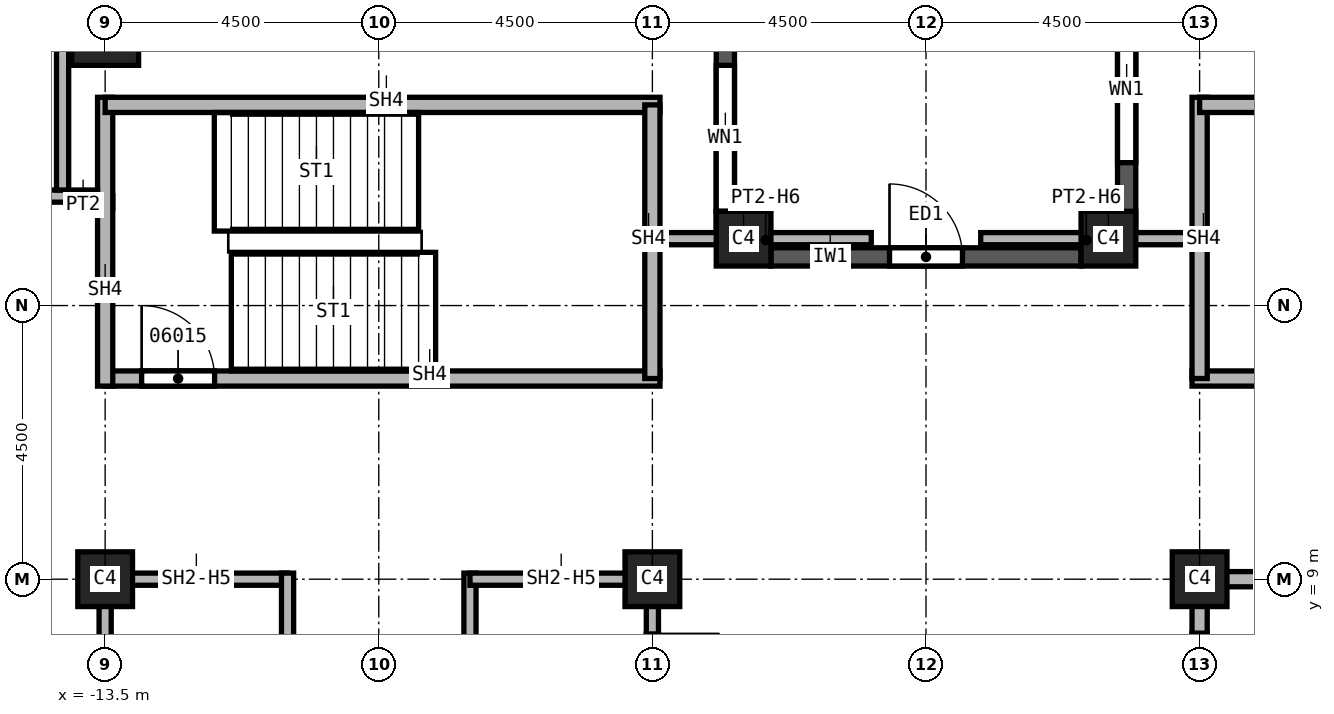
"""IFC4 building model, lengths in metres.
Left out: names, types, materials, properties, quantities, classifications, styles, units other than length and angle.
Written with IfcOpenShell. Run it as: python <this file> out.ifc"""

import sys

from ifc_helpers import new_model, si_unit, direction, frame, frame_2d, origin, origin_2d, place, context, subcontext, project, spatial, rectangle, extrude, element, fill, save


model = new_model("IFC4")
c1 = context("Model", 3, precision=1e-05, world=origin(), true_north=direction((0.0, 1.0)))
c2 = subcontext(c1, "Body", "Model", "MODEL_VIEW")
j1 = project(units=[si_unit("LENGTHUNIT", "METRE"), si_unit("PLANEANGLEUNIT", "RADIAN")], contexts=[c1])
p1 = place(None, origin())
s1 = spatial("IfcSite", under=j1, at=p1, CompositionType="ELEMENT")
p2 = place(p1, origin())
s2 = spatial("IfcBuilding", under=s1, at=p2, CompositionType="ELEMENT")
p3 = place(p2, frame((0.0, 0.0, 126.0)))
s3 = spatial("IfcBuildingStorey", under=s2, at=p3, CompositionType="ELEMENT", Elevation=126.0)
p4 = place(p3, frame((-13.5, 18.0, 0.0), z_axis=(0.0, 0.0, 1.0), x_axis=(1.0, 0.0, 0.0)))
e1 = element("IfcColumn", 1, at=p4, inside=s3, PredefinedType="COLUMN", context=c2, shape_type="SweptSolid", body=[
    extrude(rectangle(XDim=1.1, YDim=1.1, at=origin_2d()), origin(), (0.0, 0.0, 1.0), 3.7),
])
for number, where, z_axis, x_axis in (
    (2, (4.5, 9.0, 0.0), (0.0, 0.0, 1.0), (1.0, 0.0, 0.0)),
    (3, (-4.5, 9.0, 0.0), (0.0, 0.0, 1.0), (1.0, 0.0, 0.0)),
    (4, (-13.5, 9.0, 0.0), (0.0, 0.0, 1.0), (1.0, 0.0, 0.0)),
    (5, (3.0, 14.6, 0.0), (0.0, 0.0, 1.0), (1.0, 0.0, 0.0)),
    (6, (-3.0, 14.6, 0.0), (0.0, 0.0, 1.0), (1.0, 0.0, 0.0)),
):
    element("IfcColumn", number, at=place(p3, frame(where, z_axis=z_axis, x_axis=x_axis)), inside=s3, PredefinedType="COLUMN", context=c2, shape_type="SweptSolid", body=[
        extrude(rectangle(XDim=0.9, YDim=0.9, at=origin_2d()), origin(), (0.0, 0.0, 1.0), 3.7),
    ])
p5 = place(p3, frame((3.3, 23.05, 0.0), z_axis=(0.0, 0.0, 1.0), x_axis=(0.0, -1.0, 0.0)))
e7 = element("IfcWall", 7, at=p5, inside=s3, PredefinedType="SOLIDWALL", context=c2, shape_type="SweptSolid", body=[
    extrude(rectangle(XDim=8.4, YDim=0.3, at=frame_2d((4.2, 0.0))), origin(), (0.0, 0.0, 1.0), 3.1),
])
p6 = place(p5, frame((0.8, 0.0, 0.8)))
e8 = element("IfcOpeningElement", 8, at=p6, cuts=e7, PredefinedType="OPENING", context=c2, shape_type="SweptSolid", body=[
    extrude(rectangle(XDim=2.4, YDim=1.95, at=frame_2d((1.2, 0.975))), frame((0.0, 0.15, 0.0), z_axis=(0.0, -1.0, 0.0), x_axis=(1.0, 0.0, 0.0)), (0.0, 0.0, 1.0), 0.3),
])
p7 = place(p5, frame((4.8, 0.0, 0.8)))
e9 = element("IfcOpeningElement", 9, at=p7, cuts=e7, PredefinedType="OPENING", context=c2, shape_type="SweptSolid", body=[
    extrude(rectangle(XDim=2.4, YDim=1.95, at=frame_2d((1.2, 0.975))), frame((0.0, 0.15, 0.0), z_axis=(0.0, -1.0, 0.0), x_axis=(1.0, 0.0, 0.0)), (0.0, 0.0, 1.0), 0.3),
])
p8 = place(p3, frame((-2.55, 14.3, 0.0), z_axis=(0.0, 0.0, 1.0), x_axis=(1.0, 0.0, 0.0)))
e10 = element("IfcWall", 10, at=p8, inside=s3, PredefinedType="SOLIDWALL", context=c2, shape_type="SweptSolid", body=[
    extrude(rectangle(XDim=5.1, YDim=0.3, at=frame_2d((2.55, 0.0))), origin(), (0.0, 0.0, 1.0), 3.1),
])
p9 = place(p8, frame((1.95, 0.0, 0.0)))
e11 = element("IfcOpeningElement", 11, at=p9, cuts=e10, PredefinedType="OPENING", context=c2, shape_type="SweptSolid", body=[
    extrude(rectangle(XDim=1.2, YDim=2.4, at=frame_2d((0.6, 1.2))), frame((0.0, 0.15, 0.0), z_axis=(0.0, -1.0, 0.0), x_axis=(1.0, 0.0, 0.0)), (0.0, 0.0, 1.0), 0.3),
])
p10 = place(p3, frame((-3.3, 14.65, 0.0), z_axis=(0.0, 0.0, 1.0), x_axis=(0.0, 1.0, 0.0)))
e12 = element("IfcWall", 12, at=p10, inside=s3, PredefinedType="SOLIDWALL", context=c2, shape_type="SweptSolid", body=[
    extrude(rectangle(XDim=8.4, YDim=0.3, at=frame_2d((4.2, 0.0))), origin(), (0.0, 0.0, 1.0), 3.1),
])
p11 = place(p10, frame((0.4, 0.0, 0.8)))
e13 = element("IfcOpeningElement", 13, at=p11, cuts=e12, PredefinedType="OPENING", context=c2, shape_type="SweptSolid", body=[
    extrude(rectangle(XDim=2.4, YDim=1.95, at=frame_2d((1.2, 0.975))), frame((0.0, 0.15, 0.0), z_axis=(0.0, -1.0, 0.0), x_axis=(1.0, 0.0, 0.0)), (0.0, 0.0, 1.0), 0.3),
])
p12 = place(p10, frame((4.4, 0.0, 0.8)))
e14 = element("IfcOpeningElement", 14, at=p12, cuts=e12, PredefinedType="OPENING", context=c2, shape_type="SweptSolid", body=[
    extrude(rectangle(XDim=2.4, YDim=1.95, at=frame_2d((1.2, 0.975))), frame((0.0, 0.15, 0.0), z_axis=(0.0, -1.0, 0.0), x_axis=(1.0, 0.0, 0.0)), (0.0, 0.0, 1.0), 0.3),
])
p13 = place(p3, frame((-14.1, 15.2, 0.0), z_axis=(0.0, 0.0, 1.0), x_axis=(1.0, 0.0, 0.0)))
e15 = element("IfcWall", 15, at=p13, inside=s3, PredefinedType="PARTITIONING", context=c2, shape_type="SweptSolid", body=[
    extrude(rectangle(XDim=0.725, YDim=0.2, at=frame_2d((0.363, 0.0))), origin(), (0.0, 0.0, 1.0), 3.7),
])
for number, where, z_axis, x_axis in (
    (16, (-4.5, 14.6, 0.0), (0.0, 0.0, 1.0), (1.0, 0.0, 0.0)),
    (17, (0.9, 14.6, 0.0), (0.0, 0.0, 1.0), (1.0, 0.0, 0.0)),
):
    element("IfcWall", number, at=place(p3, frame(where, z_axis=z_axis, x_axis=x_axis)), inside=s3, PredefinedType="PARTITIONING", context=c2, shape_type="SweptSolid", body=[
        extrude(rectangle(XDim=3.6, YDim=0.2, at=frame_2d((1.8, 0.0))), origin(), (0.0, 0.0, 1.0), 3.088),
    ])
p14 = place(p3, frame((-13.5, 5.0, 0.0), z_axis=(0.0, 0.0, 1.0), x_axis=(0.0, 1.0, 0.0)))
e18 = element("IfcWall", 18, at=p14, inside=s3, PredefinedType="SOLIDWALL", context=c2, shape_type="SweptSolid", body=[
    extrude(rectangle(XDim=4.1, YDim=0.2, at=frame_2d((2.05, 0.0))), origin(), (0.0, 0.0, 1.0), 2.938),
])
p15 = place(p3, frame((-13.5, 9.0, 0.0), z_axis=(0.0, 0.0, 1.0), x_axis=(1.0, 0.0, 0.0)))
e19 = element("IfcWall", 19, at=p15, inside=s3, PredefinedType="SOLIDWALL", context=c2, shape_type="SweptSolid", body=[
    extrude(rectangle(XDim=3.0, YDim=0.2, at=frame_2d((1.5, 0.0))), origin(), (0.0, 0.0, 1.0), 2.938),
])
p16 = place(p3, frame((-10.5, 4.925, 0.0), z_axis=(0.0, 0.0, 1.0), x_axis=(0.0, 1.0, 0.0)))
e20 = element("IfcWall", 20, at=p16, inside=s3, PredefinedType="SOLIDWALL", context=c2, shape_type="SweptSolid", body=[
    extrude(rectangle(XDim=4.175, YDim=0.2, at=frame_2d((2.087, 0.0))), origin(), (0.0, 0.0, 1.0), 3.7),
])
p17 = place(p16, frame((0.25, 0.0, 0.0)))
e21 = element("IfcOpeningElement", 21, at=p17, cuts=e20, PredefinedType="OPENING", context=c2, shape_type="SweptSolid", body=[
    extrude(rectangle(XDim=1.1, YDim=2.1, at=frame_2d((0.55, 1.05))), frame((0.0, 0.1, 0.0), z_axis=(0.0, -1.0, 0.0), x_axis=(1.0, 0.0, 0.0)), (0.0, 0.0, 1.0), 0.2),
])
p18 = place(p3, frame((-7.5, 2.875, 0.0), z_axis=(0.0, 0.0, 1.0), x_axis=(0.0, 1.0, 0.0)))
e22 = element("IfcWall", 22, at=p18, inside=s3, PredefinedType="SOLIDWALL", context=c2, shape_type="SweptSolid", body=[
    extrude(rectangle(XDim=6.225, YDim=0.2, at=frame_2d((3.113, 0.0))), origin(), (0.0, 0.0, 1.0), 3.7),
])
p19 = place(p3, frame((-7.5, 9.0, 0.0), z_axis=(0.0, 0.0, 1.0), x_axis=(1.0, 0.0, 0.0)))
e23 = element("IfcWall", 23, at=p19, inside=s3, PredefinedType="SOLIDWALL", context=c2, shape_type="SweptSolid", body=[
    extrude(rectangle(XDim=3.0, YDim=0.2, at=frame_2d((1.5, 0.0))), origin(), (0.0, 0.0, 1.0), 2.938),
])
p20 = place(p3, frame((-4.5, 9.1, 0.0), z_axis=(0.0, 0.0, 1.0), x_axis=(0.0, -1.0, 0.0)))
e24 = element("IfcWall", 24, at=p20, inside=s3, PredefinedType="SOLIDWALL", context=c2, shape_type="SweptSolid", body=[
    extrude(rectangle(XDim=9.1, YDim=0.2, at=frame_2d((4.55, 0.0))), origin(), (0.0, 0.0, 1.0), 2.938),
])
p21 = place(p20, frame((6.5, 0.0, 0.0)))
e25 = element("IfcOpeningElement", 25, at=p21, cuts=e24, PredefinedType="OPENING", context=c2, shape_type="SweptSolid", body=[
    extrude(rectangle(XDim=1.1, YDim=2.1, at=frame_2d((0.55, 1.05))), frame((0.0, 0.1, 0.0), z_axis=(0.0, -1.0, 0.0), x_axis=(1.0, 0.0, 0.0)), (0.0, 0.0, 1.0), 0.2),
])
p22 = place(p20, frame((1.0, 0.0, 0.0)))
e26 = element("IfcOpeningElement", 26, at=p22, cuts=e24, PredefinedType="OPENING", context=c2, shape_type="SweptSolid", body=[
    extrude(rectangle(XDim=1.1, YDim=2.1, at=frame_2d((0.55, 1.05))), frame((0.0, 0.1, 0.0), z_axis=(0.0, -1.0, 0.0), x_axis=(1.0, 0.0, 0.0)), (0.0, 0.0, 1.0), 0.2),
])
p23 = place(p3, frame((4.5, 0.0, 0.0), z_axis=(0.0, 0.0, 1.0), x_axis=(0.0, 1.0, 0.0)))
e27 = element("IfcWall", 27, at=p23, inside=s3, PredefinedType="SOLIDWALL", context=c2, shape_type="SweptSolid", body=[
    extrude(rectangle(XDim=9.125, YDim=0.25, at=frame_2d((4.562, 0.0))), origin(), (0.0, 0.0, 1.0), 2.938),
])
p24 = place(p23, frame((0.95, 0.0, 0.0)))
e28 = element("IfcOpeningElement", 28, at=p24, cuts=e27, PredefinedType="OPENING", context=c2, shape_type="SweptSolid", body=[
    extrude(rectangle(XDim=1.1, YDim=2.1, at=frame_2d((0.55, 1.05))), frame((0.0, 0.125, 0.0), z_axis=(0.0, -1.0, 0.0), x_axis=(1.0, 0.0, 0.0)), (0.0, 0.0, 1.0), 0.25),
])
p25 = place(p23, frame((3.95, 0.0, 0.0)))
e29 = element("IfcOpeningElement", 29, at=p25, cuts=e27, PredefinedType="OPENING", context=c2, shape_type="SweptSolid", body=[
    extrude(rectangle(XDim=1.1, YDim=2.1, at=frame_2d((0.55, 1.05))), frame((0.0, 0.125, 0.0), z_axis=(0.0, -1.0, 0.0), x_axis=(1.0, 0.0, 0.0)), (0.0, 0.0, 1.0), 0.25),
])
p26 = place(p23, frame((7.012, 0.0, 0.0)))
e30 = element("IfcOpeningElement", 30, at=p26, cuts=e27, PredefinedType="OPENING", context=c2, shape_type="SweptSolid", body=[
    extrude(rectangle(XDim=1.1, YDim=2.1, at=frame_2d((0.55, 1.05))), frame((0.0, 0.125, 0.0), z_axis=(0.0, -1.0, 0.0), x_axis=(1.0, 0.0, 0.0)), (0.0, 0.0, 1.0), 0.25),
])
p27 = place(p3, frame((4.5, 9.0, 0.0), z_axis=(0.0, 0.0, 1.0), x_axis=(1.0, 0.0, 0.0)))
e31 = element("IfcWall", 31, at=p27, inside=s3, PredefinedType="SOLIDWALL", context=c2, shape_type="SweptSolid", body=[
    extrude(rectangle(XDim=3.0, YDim=0.25, at=frame_2d((1.5, 0.0))), origin(), (0.0, 0.0, 1.0), 2.938),
])
p28 = place(p3, frame((-13.5, 12.3, 0.0), z_axis=(0.0, 0.0, 1.0), x_axis=(1.0, 0.0, 0.0)))
e32 = element("IfcWall", 32, at=p28, inside=s3, PredefinedType="SOLIDWALL", context=c2, shape_type="SweptSolid", body=[
    extrude(rectangle(XDim=9.125, YDim=0.25, at=frame_2d((4.562, 0.0))), origin(), (0.0, 0.0, 1.0), 3.7),
])
p29 = place(p28, frame((0.6, 0.0, 0.0)))
e33 = element("IfcOpeningElement", 33, at=p29, cuts=e32, PredefinedType="OPENING", context=c2, shape_type="SweptSolid", body=[
    extrude(rectangle(XDim=1.2, YDim=2.1, at=frame_2d((0.6, 1.05))), frame((0.0, 0.125, 0.0), z_axis=(0.0, -1.0, 0.0), x_axis=(1.0, 0.0, 0.0)), (0.0, 0.0, 1.0), 0.25),
])
p30 = place(p3, frame((-13.5, 12.175, 0.0), z_axis=(0.0, 0.0, 1.0), x_axis=(0.0, 1.0, 0.0)))
e34 = element("IfcWall", 34, at=p30, inside=s3, PredefinedType="SOLIDWALL", context=c2, shape_type="SweptSolid", body=[
    extrude(rectangle(XDim=4.75, YDim=0.25, at=frame_2d((2.375, 0.0))), origin(), (0.0, 0.0, 1.0), 3.7),
])
p31 = place(p3, frame((-13.5, 16.8, 0.0), z_axis=(0.0, 0.0, 1.0), x_axis=(1.0, 0.0, 0.0)))
e35 = element("IfcWall", 35, at=p31, inside=s3, PredefinedType="SOLIDWALL", context=c2, shape_type="SweptSolid", body=[
    extrude(rectangle(XDim=9.125, YDim=0.25, at=frame_2d((4.562, 0.0))), origin(), (0.0, 0.0, 1.0), 3.7),
])
p32 = place(p3, frame((-4.5, 16.8, 0.0), z_axis=(0.0, 0.0, 1.0), x_axis=(0.0, -1.0, 0.0)))
e36 = element("IfcWall", 36, at=p32, inside=s3, PredefinedType="SOLIDWALL", context=c2, shape_type="SweptSolid", body=[
    extrude(rectangle(XDim=4.5, YDim=0.25, at=frame_2d((2.25, 0.0))), origin(), (0.0, 0.0, 1.0), 3.7),
])
p33 = place(p3, frame((4.375, 12.3, 0.0), z_axis=(0.0, 0.0, 1.0), x_axis=(1.0, 0.0, 0.0)))
e37 = element("IfcWall", 37, at=p33, inside=s3, PredefinedType="SOLIDWALL", context=c2, shape_type="SweptSolid", body=[
    extrude(rectangle(XDim=8.825, YDim=0.25, at=frame_2d((4.413, 0.0))), origin(), (0.0, 0.0, 1.0), 3.7),
])
p34 = place(p33, frame((7.2, 0.0, 0.0)))
e38 = element("IfcOpeningElement", 38, at=p34, cuts=e37, PredefinedType="OPENING", context=c2, shape_type="SweptSolid", body=[
    extrude(rectangle(XDim=1.2, YDim=2.1, at=frame_2d((0.6, 1.05))), frame((0.0, 0.125, 0.0), z_axis=(0.0, -1.0, 0.0), x_axis=(1.0, 0.0, 0.0)), (0.0, 0.0, 1.0), 0.25),
])
p35 = place(p3, frame((4.5, 12.3, 0.0), z_axis=(0.0, 0.0, 1.0), x_axis=(0.0, 1.0, 0.0)))
e39 = element("IfcWall", 39, at=p35, inside=s3, PredefinedType="SOLIDWALL", context=c2, shape_type="SweptSolid", body=[
    extrude(rectangle(XDim=4.625, YDim=0.25, at=frame_2d((2.312, 0.0))), origin(), (0.0, 0.0, 1.0), 3.7),
])
p36 = place(p3, frame((4.5, 16.8, 0.0), z_axis=(0.0, 0.0, 1.0), x_axis=(1.0, 0.0, 0.0)))
e40 = element("IfcWall", 40, at=p36, inside=s3, PredefinedType="SOLIDWALL", context=c2, shape_type="SweptSolid", body=[
    extrude(rectangle(XDim=8.7, YDim=0.25, at=frame_2d((4.35, 0.0))), origin(), (0.0, 0.0, 1.0), 3.7),
])
p37 = place(p3, frame((-21.9, 15.3, 0.0), z_axis=(0.0, 0.0, 1.0), x_axis=(1.0, 0.0, 0.0)))
e41 = element("IfcWall", 41, at=p37, inside=s3, PredefinedType="SOLIDWALL", context=c2, shape_type="SweptSolid", body=[
    extrude(rectangle(XDim=8.275, YDim=0.2, at=frame_2d((4.137, 0.0))), origin(), (0.0, 0.0, 1.0), 3.7),
])
p38 = place(p37, frame((4.8, 0.0, 0.0)))
e42 = element("IfcOpeningElement", 42, at=p38, cuts=e41, PredefinedType="OPENING", context=c2, shape_type="SweptSolid", body=[
    extrude(rectangle(XDim=1.2, YDim=2.1, at=frame_2d((0.6, 1.05))), frame((0.0, 0.1, 0.0), z_axis=(0.0, -1.0, 0.0), x_axis=(1.0, 0.0, 0.0)), (0.0, 0.0, 1.0), 0.2),
])
p39 = place(p3, frame((-14.2, 15.4, 0.0), z_axis=(0.0, 0.0, 1.0), x_axis=(0.0, 1.0, 0.0)))
e43 = element("IfcWall", 43, at=p39, inside=s3, PredefinedType="SOLIDWALL", context=c2, shape_type="SweptSolid", body=[
    extrude(rectangle(XDim=5.9, YDim=0.2, at=frame_2d((2.95, 0.0))), origin(), (0.0, 0.0, 1.0), 3.7),
])
p40 = place(p7, origin())
e44 = element("IfcWindow", 44, at=p40, inside=s3, PartitioningType="SINGLE_PANEL", PredefinedType="WINDOW", context=c2, shape_type="SweptSolid", body=[
    extrude(rectangle(XDim=2.4, YDim=1.95, at=frame_2d((1.2, 0.975))), frame((0.0, 0.03, 0.0), z_axis=(0.0, -1.0, 0.0), x_axis=(1.0, 0.0, 0.0)), (0.0, 0.0, 1.0), 0.06),
])
fill(e9, e44)
p41 = place(p9, origin())
e45 = element("IfcDoor", 45, at=p41, inside=s3, OperationType="SINGLE_SWING_LEFT", PredefinedType="DOOR", context=c2, shape_type="SweptSolid", body=[
    extrude(rectangle(XDim=1.2, YDim=2.4, at=frame_2d((0.6, 1.2))), frame((0.0, 0.025, 0.0), z_axis=(0.0, -1.0, 0.0), x_axis=(1.0, 0.0, 0.0)), (0.0, 0.0, 1.0), 0.05),
])
fill(e11, e45)
p42 = place(p11, origin())
e46 = element("IfcWindow", 46, at=p42, inside=s3, PartitioningType="SINGLE_PANEL", PredefinedType="WINDOW", context=c2, shape_type="SweptSolid", body=[
    extrude(rectangle(XDim=2.4, YDim=1.95, at=frame_2d((1.2, 0.975))), frame((0.0, 0.03, 0.0), z_axis=(0.0, -1.0, 0.0), x_axis=(1.0, 0.0, 0.0)), (0.0, 0.0, 1.0), 0.06),
])
fill(e13, e46)
p43 = place(p29, origin())
e47 = element("IfcDoor", 47, at=p43, inside=s3, OperationType="SINGLE_SWING_RIGHT", PredefinedType="DOOR", context=c2, shape_type="SweptSolid", body=[
    extrude(rectangle(XDim=1.2, YDim=2.1, at=frame_2d((0.6, 1.05))), frame((0.0, 0.025, 0.0), z_axis=(0.0, -1.0, 0.0), x_axis=(1.0, 0.0, 0.0)), (0.0, 0.0, 1.0), 0.05),
])
fill(e33, e47)
p44 = place(p26, origin())
e48 = element("IfcDoor", 48, at=p44, inside=s3, OperationType="SLIDING_TO_LEFT", PredefinedType="DOOR", context=c2, shape_type="SweptSolid", body=[
    extrude(rectangle(XDim=1.1, YDim=2.1, at=frame_2d((0.55, 1.05))), frame((0.0, 0.025, 0.0), z_axis=(0.0, -1.0, 0.0), x_axis=(1.0, 0.0, 0.0)), (0.0, 0.0, 1.0), 0.05),
])
fill(e30, e48)
save(model, sys.argv[1])
